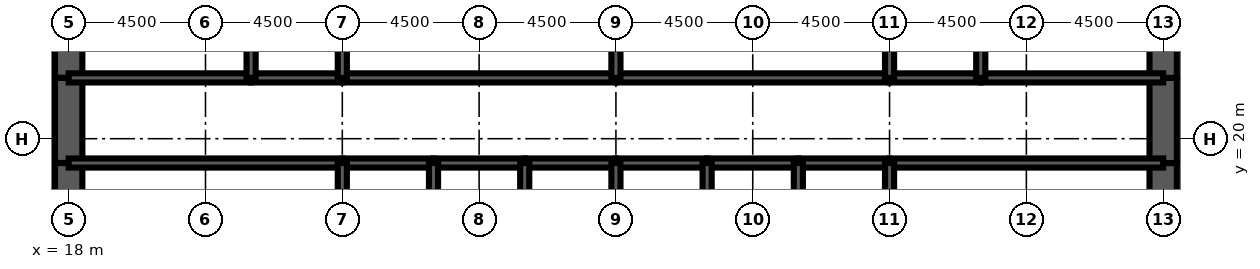
"""IFC4 building model, lengths in metres.
Left out: names, types, materials, properties, quantities, classifications, styles, units other than length and angle.
Written with IfcOpenShell. Run it as: python <this file> out.ifc"""

import sys

from ifc_helpers import new_model, si_unit, direction, frame, frame_2d, origin, place, context, subcontext, project, spatial, rectangle, extrude, element, fill, save


model = new_model("IFC4")
c1 = context("Model", 3, precision=1e-05, world=origin(), true_north=direction((0.0, 1.0)))
c2 = subcontext(c1, "Body", "Model", "MODEL_VIEW")
j1 = project(units=[si_unit("LENGTHUNIT", "METRE"), si_unit("PLANEANGLEUNIT", "RADIAN")], contexts=[c1])
p1 = place(None, origin())
s1 = spatial("IfcSite", under=j1, at=p1, CompositionType="ELEMENT")
p2 = place(p1, origin())
s2 = spatial("IfcBuilding", under=s1, at=p2, CompositionType="ELEMENT")
p3 = place(p2, frame((0.0, 0.0, 54.5)))
s3 = spatial("IfcBuildingStorey", under=s2, at=p3, CompositionType="ELEMENT", Elevation=54.5)
p4 = place(p3, frame((18.0, 26.0, 0.0), z_axis=(0.0, 0.0, 1.0), x_axis=(0.0, -1.0, 0.0)))
e1 = element("IfcWall", 1, at=p4, inside=s3, PredefinedType="SHEAR", context=c2, shape_type="SweptSolid", body=[
    extrude(rectangle(XDim=4.0, YDim=0.9, at=frame_2d((2.0, 0.0))), origin(), (0.0, 0.0, 1.0), 4.5),
])
p5 = place(p3, frame((18.0, 22.0, 0.0), z_axis=(0.0, 0.0, 1.0), x_axis=(0.0, -1.0, 0.0)))
e2 = element("IfcWall", 2, at=p5, inside=s3, PredefinedType="SHEAR", context=c2, shape_type="SweptSolid", body=[
    extrude(rectangle(XDim=2.8, YDim=0.9, at=frame_2d((1.4, 0.0))), origin(), (0.0, 0.0, 1.0), 4.5),
])
p6 = place(p5, frame((0.6, 0.0, 0.0)))
e3 = element("IfcOpeningElement", 3, at=p6, cuts=e2, PredefinedType="OPENING", context=c2, shape_type="SweptSolid", body=[
    extrude(rectangle(XDim=1.8, YDim=2.1, at=frame_2d((0.9, 1.05))), frame((0.0, 0.46, 0.0), z_axis=(0.0, -1.0, 0.0), x_axis=(1.0, 0.0, 0.0)), (0.0, 0.0, 1.0), 0.92),
])
for number, where, z_axis, x_axis in (
    (4, (18.0, 19.2, 0.0), (0.0, 0.0, 1.0), (0.0, -1.0, 0.0)),
    (5, (54.0, 16.0, 0.0), (0.0, 0.0, 1.0), (0.0, 1.0, 0.0)),
):
    element("IfcWall", number, at=place(p3, frame(where, z_axis=z_axis, x_axis=x_axis)), inside=s3, PredefinedType="SHEAR", context=c2, shape_type="SweptSolid", body=[
        extrude(rectangle(XDim=3.2, YDim=0.9, at=frame_2d((1.6, 0.0))), origin(), (0.0, 0.0, 1.0), 4.5),
    ])
p7 = place(p3, frame((54.0, 19.2, 0.0), z_axis=(0.0, 0.0, 1.0), x_axis=(0.0, 1.0, 0.0)))
e6 = element("IfcWall", 6, at=p7, inside=s3, PredefinedType="SHEAR", context=c2, shape_type="SweptSolid", body=[
    extrude(rectangle(XDim=2.8, YDim=0.9, at=frame_2d((1.4, 0.0))), origin(), (0.0, 0.0, 1.0), 4.5),
])
p8 = place(p7, frame((0.4, 0.0, 0.0)))
e7 = element("IfcOpeningElement", 7, at=p8, cuts=e6, PredefinedType="OPENING", context=c2, shape_type="SweptSolid", body=[
    extrude(rectangle(XDim=1.8, YDim=2.1, at=frame_2d((0.9, 1.05))), frame((0.0, 0.46, 0.0), z_axis=(0.0, -1.0, 0.0), x_axis=(1.0, 0.0, 0.0)), (0.0, 0.0, 1.0), 0.92),
])
p9 = place(p3, frame((54.0, 22.0, 0.0), z_axis=(0.0, 0.0, 1.0), x_axis=(0.0, 1.0, 0.0)))
e8 = element("IfcWall", 8, at=p9, inside=s3, PredefinedType="SHEAR", context=c2, shape_type="SweptSolid", body=[
    extrude(rectangle(XDim=4.0, YDim=0.9, at=frame_2d((2.0, 0.0))), origin(), (0.0, 0.0, 1.0), 4.5),
])
p10 = place(p3, frame((18.0, 19.2, 0.0), z_axis=(0.0, 0.0, 1.0), x_axis=(1.0, 0.0, 0.0)))
e9 = element("IfcWall", 9, at=p10, inside=s3, PredefinedType="SOLIDWALL", context=c2, shape_type="SweptSolid", body=[
    extrude(rectangle(XDim=9.0, YDim=0.3, at=frame_2d((4.5, 0.0))), origin(), (0.0, 0.0, 1.0), 4.5),
])
p11 = place(p10, frame((0.65, 0.0, 0.0)))
e10 = element("IfcOpeningElement", 10, at=p11, cuts=e9, PredefinedType="OPENING", context=c2, shape_type="SweptSolid", body=[
    extrude(rectangle(XDim=1.0, YDim=2.1, at=frame_2d((0.5, 1.05))), frame((0.0, 0.16, 0.0), z_axis=(0.0, -1.0, 0.0), x_axis=(1.0, 0.0, 0.0)), (0.0, 0.0, 1.0), 0.32),
])
p12 = place(p3, frame((27.0, 19.2, 0.0), z_axis=(0.0, 0.0, 1.0), x_axis=(1.0, 0.0, 0.0)))
e11 = element("IfcWall", 11, at=p12, inside=s3, PredefinedType="SOLIDWALL", context=c2, shape_type="SweptSolid", body=[
    extrude(rectangle(XDim=3.0, YDim=0.3, at=frame_2d((1.5, 0.0))), origin(), (0.0, 0.0, 1.0), 4.5),
])
p13 = place(p12, frame((0.95, 0.0, 0.0)))
e12 = element("IfcOpeningElement", 12, at=p13, cuts=e11, PredefinedType="OPENING", context=c2, shape_type="SweptSolid", body=[
    extrude(rectangle(XDim=1.1, YDim=2.2, at=frame_2d((0.55, 1.1))), frame((0.0, 0.16, 0.0), z_axis=(0.0, -1.0, 0.0), x_axis=(1.0, 0.0, 0.0)), (0.0, 0.0, 1.0), 0.32),
])
p14 = place(p3, frame((30.0, 19.2, 0.0), z_axis=(0.0, 0.0, 1.0), x_axis=(1.0, 0.0, 0.0)))
e13 = element("IfcWall", 13, at=p14, inside=s3, PredefinedType="SOLIDWALL", context=c2, shape_type="SweptSolid", body=[
    extrude(rectangle(XDim=3.0, YDim=0.3, at=frame_2d((1.5, 0.0))), origin(), (0.0, 0.0, 1.0), 4.5),
])
p15 = place(p14, frame((0.95, 0.0, 0.0)))
e14 = element("IfcOpeningElement", 14, at=p15, cuts=e13, PredefinedType="OPENING", context=c2, shape_type="SweptSolid", body=[
    extrude(rectangle(XDim=1.1, YDim=2.2, at=frame_2d((0.55, 1.1))), frame((0.0, 0.16, 0.0), z_axis=(0.0, -1.0, 0.0), x_axis=(1.0, 0.0, 0.0)), (0.0, 0.0, 1.0), 0.32),
])
p16 = place(p3, frame((33.0, 19.2, 0.0), z_axis=(0.0, 0.0, 1.0), x_axis=(1.0, 0.0, 0.0)))
e15 = element("IfcWall", 15, at=p16, inside=s3, PredefinedType="SOLIDWALL", context=c2, shape_type="SweptSolid", body=[
    extrude(rectangle(XDim=3.0, YDim=0.3, at=frame_2d((1.5, 0.0))), origin(), (0.0, 0.0, 1.0), 4.5),
])
p17 = place(p16, frame((0.95, 0.0, 0.0)))
e16 = element("IfcOpeningElement", 16, at=p17, cuts=e15, PredefinedType="OPENING", context=c2, shape_type="SweptSolid", body=[
    extrude(rectangle(XDim=1.1, YDim=2.2, at=frame_2d((0.55, 1.1))), frame((0.0, 0.16, 0.0), z_axis=(0.0, -1.0, 0.0), x_axis=(1.0, 0.0, 0.0)), (0.0, 0.0, 1.0), 0.32),
])
p18 = place(p3, frame((36.0, 19.2, 0.0), z_axis=(0.0, 0.0, 1.0), x_axis=(1.0, 0.0, 0.0)))
e17 = element("IfcWall", 17, at=p18, inside=s3, PredefinedType="SOLIDWALL", context=c2, shape_type="SweptSolid", body=[
    extrude(rectangle(XDim=3.0, YDim=0.3, at=frame_2d((1.5, 0.0))), origin(), (0.0, 0.0, 1.0), 4.5),
])
p19 = place(p18, frame((0.95, 0.0, 0.0)))
e18 = element("IfcOpeningElement", 18, at=p19, cuts=e17, PredefinedType="OPENING", context=c2, shape_type="SweptSolid", body=[
    extrude(rectangle(XDim=1.1, YDim=2.2, at=frame_2d((0.55, 1.1))), frame((0.0, 0.16, 0.0), z_axis=(0.0, -1.0, 0.0), x_axis=(1.0, 0.0, 0.0)), (0.0, 0.0, 1.0), 0.32),
])
for number, where, z_axis, x_axis in (
    (19, (39.0, 19.2, 0.0), (0.0, 0.0, 1.0), (1.0, 0.0, 0.0)),
    (20, (42.0, 19.2, 0.0), (0.0, 0.0, 1.0), (1.0, 0.0, 0.0)),
):
    element("IfcWall", number, at=place(p3, frame(where, z_axis=z_axis, x_axis=x_axis)), inside=s3, PredefinedType="SOLIDWALL", context=c2, shape_type="SweptSolid", body=[
        extrude(rectangle(XDim=3.0, YDim=0.3, at=frame_2d((1.5, 0.0))), origin(), (0.0, 0.0, 1.0), 4.5),
    ])
p20 = place(p3, frame((45.0, 19.2, 0.0), z_axis=(0.0, 0.0, 1.0), x_axis=(1.0, 0.0, 0.0)))
e21 = element("IfcWall", 21, at=p20, inside=s3, PredefinedType="SOLIDWALL", context=c2, shape_type="SweptSolid", body=[
    extrude(rectangle(XDim=9.0, YDim=0.3, at=frame_2d((4.5, 0.0))), origin(), (0.0, 0.0, 1.0), 4.5),
])
p21 = place(p20, frame((7.35, 0.0, 0.0)))
e22 = element("IfcOpeningElement", 22, at=p21, cuts=e21, PredefinedType="OPENING", context=c2, shape_type="SweptSolid", body=[
    extrude(rectangle(XDim=1.0, YDim=2.1, at=frame_2d((0.5, 1.05))), frame((0.0, 0.16, 0.0), z_axis=(0.0, -1.0, 0.0), x_axis=(1.0, 0.0, 0.0)), (0.0, 0.0, 1.0), 0.32),
])
p22 = place(p3, frame((18.0, 22.0, 0.0), z_axis=(0.0, 0.0, 1.0), x_axis=(1.0, 0.0, 0.0)))
e23 = element("IfcWall", 23, at=p22, inside=s3, PredefinedType="SOLIDWALL", context=c2, shape_type="SweptSolid", body=[
    extrude(rectangle(XDim=6.0, YDim=0.3, at=frame_2d((3.0, 0.0))), origin(), (0.0, 0.0, 1.0), 4.5),
])
p23 = place(p22, frame((4.4, 0.0, 0.0)))
e24 = element("IfcOpeningElement", 24, at=p23, cuts=e23, PredefinedType="OPENING", context=c2, shape_type="SweptSolid", body=[
    extrude(rectangle(XDim=1.0, YDim=2.1, at=frame_2d((0.5, 1.05))), frame((0.0, 0.16, 0.0), z_axis=(0.0, -1.0, 0.0), x_axis=(1.0, 0.0, 0.0)), (0.0, 0.0, 1.0), 0.32),
])
p24 = place(p22, frame((0.7, 0.0, 0.0)))
e25 = element("IfcOpeningElement", 25, at=p24, cuts=e23, PredefinedType="OPENING", context=c2, shape_type="SweptSolid", body=[
    extrude(rectangle(XDim=1.0, YDim=2.1, at=frame_2d((0.5, 1.05))), frame((0.0, 0.16, 0.0), z_axis=(0.0, -1.0, 0.0), x_axis=(1.0, 0.0, 0.0)), (0.0, 0.0, 1.0), 0.32),
])
p25 = place(p3, frame((24.0, 22.0, 0.0), z_axis=(0.0, 0.0, 1.0), x_axis=(1.0, 0.0, 0.0)))
e26 = element("IfcWall", 26, at=p25, inside=s3, PredefinedType="SOLIDWALL", context=c2, shape_type="SweptSolid", body=[
    extrude(rectangle(XDim=3.0, YDim=0.3, at=frame_2d((1.5, 0.0))), origin(), (0.0, 0.0, 1.0), 4.5),
])
p26 = place(p25, frame((1.0, 0.0, 0.0)))
e27 = element("IfcOpeningElement", 27, at=p26, cuts=e26, PredefinedType="OPENING", context=c2, shape_type="SweptSolid", body=[
    extrude(rectangle(XDim=1.0, YDim=2.1, at=frame_2d((0.5, 1.05))), frame((0.0, 0.16, 0.0), z_axis=(0.0, -1.0, 0.0), x_axis=(1.0, 0.0, 0.0)), (0.0, 0.0, 1.0), 0.32),
])
p27 = place(p3, frame((27.0, 22.0, 0.0), z_axis=(0.0, 0.0, 1.0), x_axis=(1.0, 0.0, 0.0)))
e28 = element("IfcWall", 28, at=p27, inside=s3, PredefinedType="SOLIDWALL", context=c2, shape_type="SweptSolid", body=[
    extrude(rectangle(XDim=9.0, YDim=0.3, at=frame_2d((4.5, 0.0))), origin(), (0.0, 0.0, 1.0), 4.5),
])
p28 = place(p27, frame((4.0, 0.0, 0.0)))
e29 = element("IfcOpeningElement", 29, at=p28, cuts=e28, PredefinedType="OPENING", context=c2, shape_type="SweptSolid", body=[
    extrude(rectangle(XDim=1.0, YDim=2.1, at=frame_2d((0.5, 1.05))), frame((0.0, 0.16, 0.0), z_axis=(0.0, -1.0, 0.0), x_axis=(1.0, 0.0, 0.0)), (0.0, 0.0, 1.0), 0.32),
])
p29 = place(p3, frame((36.0, 22.0, 0.0), z_axis=(0.0, 0.0, 1.0), x_axis=(1.0, 0.0, 0.0)))
e30 = element("IfcWall", 30, at=p29, inside=s3, PredefinedType="SOLIDWALL", context=c2, shape_type="SweptSolid", body=[
    extrude(rectangle(XDim=9.0, YDim=0.3, at=frame_2d((4.5, 0.0))), origin(), (0.0, 0.0, 1.0), 4.5),
])
p30 = place(p29, frame((4.0, 0.0, 0.0)))
e31 = element("IfcOpeningElement", 31, at=p30, cuts=e30, PredefinedType="OPENING", context=c2, shape_type="SweptSolid", body=[
    extrude(rectangle(XDim=1.0, YDim=2.1, at=frame_2d((0.5, 1.05))), frame((0.0, 0.16, 0.0), z_axis=(0.0, -1.0, 0.0), x_axis=(1.0, 0.0, 0.0)), (0.0, 0.0, 1.0), 0.32),
])
p31 = place(p3, frame((45.0, 22.0, 0.0), z_axis=(0.0, 0.0, 1.0), x_axis=(1.0, 0.0, 0.0)))
e32 = element("IfcWall", 32, at=p31, inside=s3, PredefinedType="SOLIDWALL", context=c2, shape_type="SweptSolid", body=[
    extrude(rectangle(XDim=3.0, YDim=0.3, at=frame_2d((1.5, 0.0))), origin(), (0.0, 0.0, 1.0), 4.5),
])
p32 = place(p31, frame((1.0, 0.0, 0.0)))
e33 = element("IfcOpeningElement", 33, at=p32, cuts=e32, PredefinedType="OPENING", context=c2, shape_type="SweptSolid", body=[
    extrude(rectangle(XDim=1.0, YDim=2.1, at=frame_2d((0.5, 1.05))), frame((0.0, 0.16, 0.0), z_axis=(0.0, -1.0, 0.0), x_axis=(1.0, 0.0, 0.0)), (0.0, 0.0, 1.0), 0.32),
])
p33 = place(p3, frame((48.0, 22.0, 0.0), z_axis=(0.0, 0.0, 1.0), x_axis=(1.0, 0.0, 0.0)))
e34 = element("IfcWall", 34, at=p33, inside=s3, PredefinedType="SOLIDWALL", context=c2, shape_type="SweptSolid", body=[
    extrude(rectangle(XDim=6.0, YDim=0.3, at=frame_2d((3.0, 0.0))), origin(), (0.0, 0.0, 1.0), 4.5),
])
p34 = place(p33, frame((2.0, 0.0, 0.0)))
e35 = element("IfcOpeningElement", 35, at=p34, cuts=e34, PredefinedType="OPENING", context=c2, shape_type="SweptSolid", body=[
    extrude(rectangle(XDim=1.0, YDim=2.1, at=frame_2d((0.5, 1.05))), frame((0.0, 0.16, 0.0), z_axis=(0.0, -1.0, 0.0), x_axis=(1.0, 0.0, 0.0)), (0.0, 0.0, 1.0), 0.32),
])
p35 = place(p33, frame((4.3, 0.0, 0.0)))
e36 = element("IfcOpeningElement", 36, at=p35, cuts=e34, PredefinedType="OPENING", context=c2, shape_type="SweptSolid", body=[
    extrude(rectangle(XDim=1.0, YDim=2.1, at=frame_2d((0.5, 1.05))), frame((0.0, 0.16, 0.0), z_axis=(0.0, -1.0, 0.0), x_axis=(1.0, 0.0, 0.0)), (0.0, 0.0, 1.0), 0.32),
])
for number, where, z_axis, x_axis in (
    (37, (27.0, 16.0, 0.0), (0.0, 0.0, 1.0), (0.0, 1.0, 0.0)),
    (38, (30.0, 16.0, 0.0), (0.0, 0.0, 1.0), (0.0, 1.0, 0.0)),
    (39, (33.0, 16.0, 0.0), (0.0, 0.0, 1.0), (0.0, 1.0, 0.0)),
    (40, (36.0, 16.0, 0.0), (0.0, 0.0, 1.0), (0.0, 1.0, 0.0)),
    (41, (39.0, 16.0, 0.0), (0.0, 0.0, 1.0), (0.0, 1.0, 0.0)),
    (42, (42.0, 16.0, 0.0), (0.0, 0.0, 1.0), (0.0, 1.0, 0.0)),
    (43, (45.0, 16.0, 0.0), (0.0, 0.0, 1.0), (0.0, 1.0, 0.0)),
):
    element("IfcWall", number, at=place(p3, frame(where, z_axis=z_axis, x_axis=x_axis)), inside=s3, PredefinedType="SOLIDWALL", context=c2, shape_type="SweptSolid", body=[
        extrude(rectangle(XDim=3.2, YDim=0.3, at=frame_2d((1.6, 0.0))), origin(), (0.0, 0.0, 1.0), 4.5),
    ])
for number, where, z_axis, x_axis in (
    (44, (24.0, 22.0, 0.0), (0.0, 0.0, 1.0), (0.0, 1.0, 0.0)),
    (45, (27.0, 22.0, 0.0), (0.0, 0.0, 1.0), (0.0, 1.0, 0.0)),
    (46, (36.0, 22.0, 0.0), (0.0, 0.0, 1.0), (0.0, 1.0, 0.0)),
    (47, (45.0, 22.0, 0.0), (0.0, 0.0, 1.0), (0.0, 1.0, 0.0)),
    (48, (48.0, 22.0, 0.0), (0.0, 0.0, 1.0), (0.0, 1.0, 0.0)),
):
    element("IfcWall", number, at=place(p3, frame(where, z_axis=z_axis, x_axis=x_axis)), inside=s3, PredefinedType="SOLIDWALL", context=c2, shape_type="SweptSolid", body=[
        extrude(rectangle(XDim=4.0, YDim=0.3, at=frame_2d((2.0, 0.0))), origin(), (0.0, 0.0, 1.0), 4.5),
    ])
for number, where, z_axis, x_axis in (
    (49, (20.025, 22.15, 0.0), (0.0, 0.0, 1.0), (0.0, 1.0, 0.0)),
    (50, (51.975, 22.15, 0.0), (0.0, 0.0, 1.0), (0.0, 1.0, 0.0)),
):
    element("IfcWall", number, at=place(p3, frame(where, z_axis=z_axis, x_axis=x_axis)), inside=s3, PredefinedType="PARTITIONING", context=c2, shape_type="SweptSolid", body=[
        extrude(rectangle(XDim=3.7, YDim=0.15, at=frame_2d((1.85, 0.0))), origin(), (0.0, 0.0, 1.0), 3.0),
    ])
p36 = place(p3, frame((24.5, 19.35, 0.0), z_axis=(0.0, 0.0, 1.0), x_axis=(0.0, 1.0, 0.0)))
e51 = element("IfcWall", 51, at=p36, inside=s3, PredefinedType="PARTITIONING", context=c2, shape_type="SweptSolid", body=[
    extrude(rectangle(XDim=2.5, YDim=0.15, at=frame_2d((1.25, 0.0))), origin(), (0.0, 0.0, 1.0), 3.0),
])
p37 = place(p36, frame((1.15, 0.0, 0.0)))
e52 = element("IfcOpeningElement", 52, at=p37, cuts=e51, PredefinedType="OPENING", context=c2, shape_type="SweptSolid", body=[
    extrude(rectangle(XDim=1.0, YDim=2.1, at=frame_2d((0.5, 1.05))), frame((0.0, 0.085, 0.0), z_axis=(0.0, -1.0, 0.0), x_axis=(1.0, 0.0, 0.0)), (0.0, 0.0, 1.0), 0.17),
])
p38 = place(p37, origin())
e53 = element("IfcDoor", 53, at=p38, inside=s3, OperationType="SINGLE_SWING_RIGHT", PredefinedType="DOOR", context=c2, shape_type="SweptSolid", body=[
    extrude(rectangle(XDim=1.0, YDim=2.1, at=frame_2d((0.5, 1.05))), frame((0.0, 0.025, 0.0), z_axis=(0.0, -1.0, 0.0), x_axis=(1.0, 0.0, 0.0)), (0.0, 0.0, 1.0), 0.05),
])
fill(e52, e53)
p39 = place(p13, origin())
e54 = element("IfcDoor", 54, at=p39, inside=s3, OperationType="DOUBLE_DOOR_SLIDING", PredefinedType="USERDEFINED", context=c2, shape_type="SweptSolid", body=[
    extrude(rectangle(XDim=1.1, YDim=2.2, at=frame_2d((0.55, 1.1))), frame((0.0, 0.025, 0.0), z_axis=(0.0, -1.0, 0.0), x_axis=(1.0, 0.0, 0.0)), (0.0, 0.0, 1.0), 0.05),
])
fill(e12, e54)
p40 = place(p15, origin())
e55 = element("IfcDoor", 55, at=p40, inside=s3, OperationType="DOUBLE_DOOR_SLIDING", PredefinedType="USERDEFINED", context=c2, shape_type="SweptSolid", body=[
    extrude(rectangle(XDim=1.1, YDim=2.2, at=frame_2d((0.55, 1.1))), frame((0.0, 0.025, 0.0), z_axis=(0.0, -1.0, 0.0), x_axis=(1.0, 0.0, 0.0)), (0.0, 0.0, 1.0), 0.05),
])
fill(e14, e55)
p41 = place(p17, origin())
e56 = element("IfcDoor", 56, at=p41, inside=s3, OperationType="DOUBLE_DOOR_SLIDING", PredefinedType="USERDEFINED", context=c2, shape_type="SweptSolid", body=[
    extrude(rectangle(XDim=1.1, YDim=2.2, at=frame_2d((0.55, 1.1))), frame((0.0, 0.025, 0.0), z_axis=(0.0, -1.0, 0.0), x_axis=(1.0, 0.0, 0.0)), (0.0, 0.0, 1.0), 0.05),
])
fill(e16, e56)
p42 = place(p19, origin())
e57 = element("IfcDoor", 57, at=p42, inside=s3, OperationType="DOUBLE_DOOR_SLIDING", PredefinedType="USERDEFINED", context=c2, shape_type="SweptSolid", body=[
    extrude(rectangle(XDim=1.1, YDim=2.2, at=frame_2d((0.55, 1.1))), frame((0.0, 0.025, 0.0), z_axis=(0.0, -1.0, 0.0), x_axis=(1.0, 0.0, 0.0)), (0.0, 0.0, 1.0), 0.05),
])
fill(e18, e57)
p43 = place(p11, origin())
e58 = element("IfcDoor", 58, at=p43, inside=s3, OperationType="SINGLE_SWING_LEFT", PredefinedType="DOOR", context=c2, shape_type="SweptSolid", body=[
    extrude(rectangle(XDim=1.0, YDim=2.1, at=frame_2d((0.5, 1.05))), frame((0.0, 0.025, 0.0), z_axis=(0.0, -1.0, 0.0), x_axis=(1.0, 0.0, 0.0)), (0.0, 0.0, 1.0), 0.05),
])
fill(e10, e58)
p44 = place(p21, origin())
e59 = element("IfcDoor", 59, at=p44, inside=s3, OperationType="SINGLE_SWING_RIGHT", PredefinedType="DOOR", context=c2, shape_type="SweptSolid", body=[
    extrude(rectangle(XDim=1.0, YDim=2.1, at=frame_2d((0.5, 1.05))), frame((0.0, 0.025, 0.0), z_axis=(0.0, -1.0, 0.0), x_axis=(1.0, 0.0, 0.0)), (0.0, 0.0, 1.0), 0.05),
])
fill(e22, e59)
p45 = place(p6, origin())
e60 = element("IfcDoor", 60, at=p45, inside=s3, OperationType="SINGLE_SWING_LEFT", PredefinedType="DOOR", context=c2, shape_type="SweptSolid", body=[
    extrude(rectangle(XDim=1.8, YDim=2.1, at=frame_2d((0.9, 1.05))), frame((0.0, 0.45, 0.0), z_axis=(0.0, -1.0, 0.0), x_axis=(1.0, 0.0, 0.0)), (0.0, 0.0, 1.0), 0.899),
])
fill(e3, e60)
p46 = place(p8, origin())
e61 = element("IfcDoor", 61, at=p46, inside=s3, OperationType="SINGLE_SWING_LEFT", PredefinedType="DOOR", context=c2, shape_type="SweptSolid", body=[
    extrude(rectangle(XDim=1.8, YDim=2.1, at=frame_2d((0.9, 1.05))), frame((0.0, 0.45, 0.0), z_axis=(0.0, -1.0, 0.0), x_axis=(1.0, 0.0, 0.0)), (0.0, 0.0, 1.0), 0.899),
])
fill(e7, e61)
p47 = place(p23, origin())
e62 = element("IfcDoor", 62, at=p47, inside=s3, OperationType="SINGLE_SWING_RIGHT", PredefinedType="DOOR", context=c2, shape_type="SweptSolid", body=[
    extrude(rectangle(XDim=1.0, YDim=2.1, at=frame_2d((0.5, 1.05))), frame((0.0, 0.025, 0.0), z_axis=(0.0, -1.0, 0.0), x_axis=(1.0, 0.0, 0.0)), (0.0, 0.0, 1.0), 0.05),
])
fill(e24, e62)
p48 = place(p26, origin())
e63 = element("IfcDoor", 63, at=p48, inside=s3, OperationType="SINGLE_SWING_LEFT", PredefinedType="DOOR", context=c2, shape_type="SweptSolid", body=[
    extrude(rectangle(XDim=1.0, YDim=2.1, at=frame_2d((0.5, 1.05))), frame((0.0, 0.025, 0.0), z_axis=(0.0, -1.0, 0.0), x_axis=(1.0, 0.0, 0.0)), (0.0, 0.0, 1.0), 0.05),
])
fill(e27, e63)
p49 = place(p28, origin())
e64 = element("IfcDoor", 64, at=p49, inside=s3, OperationType="SINGLE_SWING_LEFT", PredefinedType="DOOR", context=c2, shape_type="SweptSolid", body=[
    extrude(rectangle(XDim=1.0, YDim=2.1, at=frame_2d((0.5, 1.05))), frame((0.0, 0.025, 0.0), z_axis=(0.0, -1.0, 0.0), x_axis=(1.0, 0.0, 0.0)), (0.0, 0.0, 1.0), 0.05),
])
fill(e29, e64)
p50 = place(p30, origin())
e65 = element("IfcDoor", 65, at=p50, inside=s3, OperationType="SINGLE_SWING_LEFT", PredefinedType="DOOR", context=c2, shape_type="SweptSolid", body=[
    extrude(rectangle(XDim=1.0, YDim=2.1, at=frame_2d((0.5, 1.05))), frame((0.0, 0.025, 0.0), z_axis=(0.0, -1.0, 0.0), x_axis=(1.0, 0.0, 0.0)), (0.0, 0.0, 1.0), 0.05),
])
fill(e31, e65)
p51 = place(p32, origin())
e66 = element("IfcDoor", 66, at=p51, inside=s3, OperationType="SINGLE_SWING_LEFT", PredefinedType="DOOR", context=c2, shape_type="SweptSolid", body=[
    extrude(rectangle(XDim=1.0, YDim=2.1, at=frame_2d((0.5, 1.05))), frame((0.0, 0.025, 0.0), z_axis=(0.0, -1.0, 0.0), x_axis=(1.0, 0.0, 0.0)), (0.0, 0.0, 1.0), 0.05),
])
fill(e33, e66)
p52 = place(p34, origin())
e67 = element("IfcDoor", 67, at=p52, inside=s3, OperationType="SINGLE_SWING_LEFT", PredefinedType="DOOR", context=c2, shape_type="SweptSolid", body=[
    extrude(rectangle(XDim=1.0, YDim=2.1, at=frame_2d((0.5, 1.05))), frame((0.0, 0.025, 0.0), z_axis=(0.0, -1.0, 0.0), x_axis=(1.0, 0.0, 0.0)), (0.0, 0.0, 1.0), 0.05),
])
fill(e35, e67)
p53 = place(p24, origin())
e68 = element("IfcDoor", 68, at=p53, inside=s3, OperationType="SINGLE_SWING_LEFT", PredefinedType="DOOR", context=c2, shape_type="SweptSolid", body=[
    extrude(rectangle(XDim=1.0, YDim=2.1, at=frame_2d((0.5, 1.05))), frame((0.0, 0.025, 0.0), z_axis=(0.0, -1.0, 0.0), x_axis=(1.0, 0.0, 0.0)), (0.0, 0.0, 1.0), 0.05),
])
fill(e25, e68)
p54 = place(p35, origin())
e69 = element("IfcDoor", 69, at=p54, inside=s3, OperationType="SINGLE_SWING_RIGHT", PredefinedType="DOOR", context=c2, shape_type="SweptSolid", body=[
    extrude(rectangle(XDim=1.0, YDim=2.1, at=frame_2d((0.5, 1.05))), frame((0.0, 0.025, 0.0), z_axis=(0.0, -1.0, 0.0), x_axis=(1.0, 0.0, 0.0)), (0.0, 0.0, 1.0), 0.05),
])
fill(e36, e69)
save(model, sys.argv[1])
